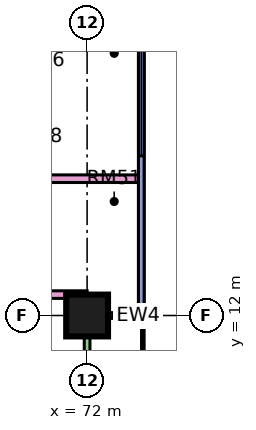
"""IFC4 building model, lengths in metres.
Left out: names, types, materials, properties, quantities, classifications, styles, units other than length and angle.
Written with IfcOpenShell. Run it as: python <this file> out.ifc"""

import sys

from ifc_helpers import new_model, si_unit, direction, frame, frame_2d, origin, origin_2d, place, context, subcontext, project, spatial, rectangle, extrude, element, fill, save


model = new_model("IFC4")
c1 = context("Model", 3, precision=1e-05, world=origin(), true_north=direction((0.0, 1.0)))
c2 = subcontext(c1, "Body", "Model", "MODEL_VIEW")
j1 = project(units=[si_unit("LENGTHUNIT", "METRE"), si_unit("PLANEANGLEUNIT", "RADIAN")], contexts=[c1])
p1 = place(None, origin())
s1 = spatial("IfcSite", under=j1, at=p1, CompositionType="ELEMENT")
p2 = place(p1, origin())
s2 = spatial("IfcBuilding", under=s1, at=p2, CompositionType="ELEMENT")
p3 = place(p2, frame((0.0, 0.0, 63.9)))
s3 = spatial("IfcBuildingStorey", under=s2, at=p3, CompositionType="ELEMENT", Elevation=63.9)
p4 = place(p3, frame((72.0, 12.0, 0.0), z_axis=(0.0, 0.0, 1.0), x_axis=(1.0, 0.0, 0.0)))
e1 = element("IfcColumn", 1, at=p4, inside=s3, PredefinedType="COLUMN", context=c2, shape_type="SweptSolid", body=[
    extrude(rectangle(XDim=1.1, YDim=1.1, at=origin_2d()), origin(), (0.0, 0.0, 1.0), 3.75),
])
p5 = place(p3, frame((72.0, 1.575, 0.0), z_axis=(0.0, 0.0, 1.0), x_axis=(0.0, 1.0, 0.0)))
e2 = element("IfcWall", 2, at=p5, inside=s3, PredefinedType="SOLIDWALL", context=c2, shape_type="SweptSolid", body=[
    extrude(rectangle(XDim=10.35, YDim=0.15, at=frame_2d((5.175, 0.0))), origin(), (0.0, 0.0, 1.0), 3.35),
])
p6 = place(p5, frame((1.587, 0.0, 0.0)))
e3 = element("IfcOpeningElement", 3, at=p6, cuts=e2, PredefinedType="OPENING", context=c2, shape_type="SweptSolid", body=[
    extrude(rectangle(XDim=1.8, YDim=2.4, at=frame_2d((0.9, 1.2))), frame((0.0, 0.085, 0.0), z_axis=(0.0, -1.0, 0.0), x_axis=(1.0, 0.0, 0.0)), (0.0, 0.0, 1.0), 0.17),
])
p7 = place(p5, frame((5.875, 0.0, 0.45)))
e4 = element("IfcOpeningElement", 4, at=p7, cuts=e2, PredefinedType="OPENING", context=c2, shape_type="SweptSolid", body=[
    extrude(rectangle(XDim=3.0, YDim=2.4, at=frame_2d((1.5, 1.2))), frame((0.0, 0.085, 0.0), z_axis=(0.0, -1.0, 0.0), x_axis=(1.0, 0.0, 0.0)), (0.0, 0.0, 1.0), 0.17),
])
p8 = place(p3, frame((73.5, 12.0, 0.0), z_axis=(0.0, 0.0, 1.0), x_axis=(-1.0, 0.0, 0.0)))
e5 = element("IfcWall", 5, at=p8, inside=s3, PredefinedType="SOLIDWALL", context=c2, shape_type="SweptSolid", body=[
    extrude(rectangle(XDim=1.5, YDim=0.15, at=frame_2d((0.75, 0.0))), origin(), (0.0, 0.0, 1.0), 3.35),
])
p9 = place(p3, frame((73.425, 12.075, 0.0), z_axis=(0.0, 0.0, 1.0), x_axis=(0.0, 1.0, 0.0)))
e6 = element("IfcWall", 6, at=p9, inside=s3, PredefinedType="SOLIDWALL", context=c2, shape_type="SweptSolid", body=[
    extrude(rectangle(XDim=10.425, YDim=0.15, at=frame_2d((5.212, 0.0))), origin(), (0.0, 0.0, 1.0), 3.35),
])
p10 = place(p9, frame((4.125, 0.0, 0.45)))
e7 = element("IfcOpeningElement", 7, at=p10, cuts=e6, PredefinedType="OPENING", context=c2, shape_type="SweptSolid", body=[
    extrude(rectangle(XDim=3.0, YDim=2.4, at=frame_2d((1.5, 1.2))), frame((0.0, 0.085, 0.0), z_axis=(0.0, -1.0, 0.0), x_axis=(1.0, 0.0, 0.0)), (0.0, 0.0, 1.0), 0.17),
])
p11 = place(p9, frame((8.175, 0.0, 0.45)))
e8 = element("IfcOpeningElement", 8, at=p11, cuts=e6, PredefinedType="OPENING", context=c2, shape_type="SweptSolid", body=[
    extrude(rectangle(XDim=1.8, YDim=2.4, at=frame_2d((0.9, 1.2))), frame((0.0, 0.085, 0.0), z_axis=(0.0, -1.0, 0.0), x_axis=(1.0, 0.0, 0.0)), (0.0, 0.0, 1.0), 0.17),
])
p12 = place(p3, frame((40.65, 12.55, 0.0), z_axis=(0.0, 0.0, 1.0), x_axis=(1.0, 0.0, 0.0)))
e9 = element("IfcWall", 9, at=p12, inside=s3, PredefinedType="PARTITIONING", context=c2, shape_type="SweptSolid", body=[
    extrude(rectangle(XDim=31.35, YDim=0.2, at=frame_2d((15.675, 0.0))), origin(), (0.0, 0.0, 1.0), 3.35),
])
p13 = place(p12, frame((26.4, 0.0, 0.0)))
e10 = element("IfcOpeningElement", 10, at=p13, cuts=e9, PredefinedType="OPENING", context=c2, shape_type="SweptSolid", body=[
    extrude(rectangle(XDim=1.0, YDim=2.1, at=frame_2d((0.5, 1.05))), frame((0.0, 0.11, 0.0), z_axis=(0.0, -1.0, 0.0), x_axis=(1.0, 0.0, 0.0)), (0.0, 0.0, 1.0), 0.22),
])
p14 = place(p12, frame((1.05, 0.0, 0.0)))
e11 = element("IfcOpeningElement", 11, at=p14, cuts=e9, PredefinedType="OPENING", context=c2, shape_type="SweptSolid", body=[
    extrude(rectangle(XDim=1.0, YDim=2.1, at=frame_2d((0.5, 1.05))), frame((0.0, 0.11, 0.0), z_axis=(0.0, -1.0, 0.0), x_axis=(1.0, 0.0, 0.0)), (0.0, 0.0, 1.0), 0.22),
])
p15 = place(p3, frame((51.225, 15.6, 0.0), z_axis=(0.0, 0.0, 1.0), x_axis=(1.0, 0.0, 0.0)))
e12 = element("IfcWall", 12, at=p15, inside=s3, PredefinedType="PARTITIONING", context=c2, shape_type="SweptSolid", body=[
    extrude(rectangle(XDim=22.125, YDim=0.2, at=frame_2d((11.062, 0.0))), origin(), (0.0, 0.0, 1.0), 3.35),
])
p16 = place(p15, frame((18.725, 0.0, 0.0)))
e13 = element("IfcOpeningElement", 13, at=p16, cuts=e12, PredefinedType="OPENING", context=c2, shape_type="SweptSolid", body=[
    extrude(rectangle(XDim=1.0, YDim=2.1, at=frame_2d((0.5, 1.05))), frame((0.0, 0.11, 0.0), z_axis=(0.0, -1.0, 0.0), x_axis=(1.0, 0.0, 0.0)), (0.0, 0.0, 1.0), 0.22),
])
p17 = place(p15, frame((0.875, 0.0, 0.0)))
e14 = element("IfcOpeningElement", 14, at=p17, cuts=e12, PredefinedType="OPENING", context=c2, shape_type="SweptSolid", body=[
    extrude(rectangle(XDim=1.0, YDim=2.1, at=frame_2d((0.5, 1.05))), frame((0.0, 0.11, 0.0), z_axis=(0.0, -1.0, 0.0), x_axis=(1.0, 0.0, 0.0)), (0.0, 0.0, 1.0), 0.22),
])
p18 = place(p10, origin())
e15 = element("IfcWindow", 15, at=p18, inside=s3, PartitioningType="SINGLE_PANEL", PredefinedType="WINDOW", context=c2, shape_type="SweptSolid", body=[
    extrude(rectangle(XDim=3.0, YDim=2.4, at=frame_2d((1.5, 1.2))), frame((0.0, 0.03, 0.0), z_axis=(0.0, -1.0, 0.0), x_axis=(1.0, 0.0, 0.0)), (0.0, 0.0, 1.0), 0.06),
])
fill(e7, e15)
save(model, sys.argv[1])
